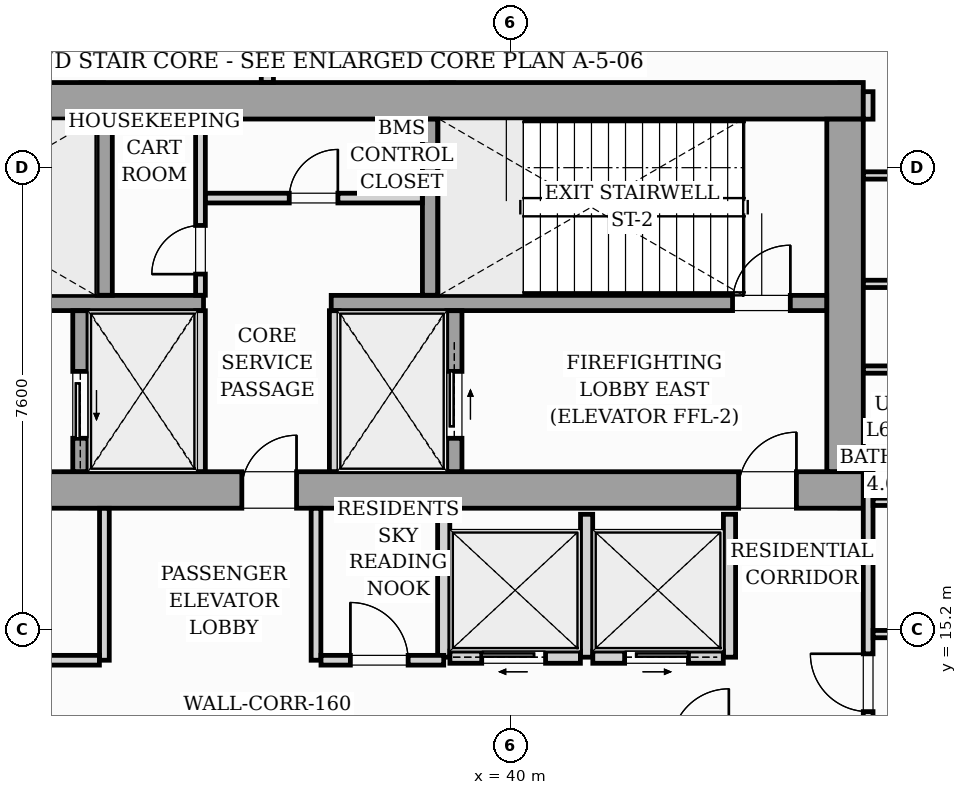
"""IFC4 building model, lengths in metres.
Left out: names, types, materials, properties, quantities, classifications, styles, units other than length and angle.
Written with IfcOpenShell. Run it as: python <this file> out.ifc"""

import sys

from ifc_helpers import new_model, si_unit, direction, frame, frame_2d, origin, origin_2d, place, context, subcontext, project, spatial, rectangle, i_section, extrude, source, transform, mapped, element, fill, save


model = new_model("IFC4")
c1 = context("Model", 3, precision=1e-05, world=origin(), true_north=direction((0.0, 1.0)))
c2 = subcontext(c1, "Body", "Model", "MODEL_VIEW")
j1 = project(units=[si_unit("LENGTHUNIT", "METRE"), si_unit("PLANEANGLEUNIT", "RADIAN")], contexts=[c1])
p1 = place(None, origin())
s1 = spatial("IfcSite", under=j1, at=p1, CompositionType="ELEMENT")
p2 = place(p1, origin())
s2 = spatial("IfcBuilding", under=s1, at=p2, CompositionType="ELEMENT")
p3 = place(p2, frame((0.0, 0.0, 211.4)))
s3 = spatial("IfcBuildingStorey", under=s2, at=p3, CompositionType="ELEMENT", Elevation=211.4)
m1 = source(origin(), c2, "Body", "SweptSolid", [
    extrude(i_section(OverallWidth=0.409, OverallDepth=0.425, WebThickness=0.033, FlangeThickness=0.052, FilletRadius=0.018, at=origin_2d()), origin(), (0.0, 0.0, 1.0), 5.196),
])
for number, where, z_axis, x_axis in (
    (1, (33.12, 17.4, 0.002), (0.0, 0.0, 1.0), (1.0, 0.0, 0.0)),
    (2, (38.88, 17.4, 0.002), (0.0, 0.0, 1.0), (1.0, 0.0, 0.0)),
    (3, (45.6, 17.4, 0.002), (0.0, 0.0, 1.0), (1.0, 0.0, 0.0)),
    (4, (33.12, 24.0, 0.002), (0.0, 0.0, 1.0), (1.0, 0.0, 0.0)),
    (5, (38.88, 24.0, 0.002), (0.0, 0.0, 1.0), (1.0, 0.0, 0.0)),
    (6, (45.6, 24.0, 0.002), (0.0, 0.0, 1.0), (1.0, 0.0, 0.0)),
):
    element("IfcColumn", number, at=place(p3, frame(where, z_axis=z_axis, x_axis=x_axis)), inside=s3, PredefinedType="PILASTER", context=c2, shape_type="MappedRepresentation", body=[
        mapped(m1, transform((0.0, 0.0, 0.0), scale=1.0)),
    ])
p4 = place(p3, frame((26.2, 17.5, 0.0), z_axis=(0.0, 0.0, 1.0), x_axis=(1.0, 0.0, 0.0)))
e7 = element("IfcWall", 7, at=p4, inside=s3, PredefinedType="SHEAR", context=c2, shape_type="SweptSolid", body=[
    extrude(rectangle(XDim=19.6, YDim=0.6, at=frame_2d((9.8, 0.0))), origin(), (0.0, 0.0, 1.0), 5.2),
])
p5 = place(p4, frame((0.95, 0.0, 0.0)))
e8 = element("IfcOpeningElement", 8, at=p5, cuts=e7, PredefinedType="OPENING", context=c2, shape_type="SweptSolid", body=[
    extrude(rectangle(XDim=0.95, YDim=2.06, at=frame_2d((0.475, 1.03))), frame((0.0, 0.31, 0.0), z_axis=(0.0, -1.0, 0.0), x_axis=(1.0, 0.0, 0.0)), (0.0, 0.0, 1.0), 0.62),
])
p6 = place(p4, frame((9.38, 0.0, 0.0)))
e9 = element("IfcOpeningElement", 9, at=p6, cuts=e7, PredefinedType="OPENING", context=c2, shape_type="SweptSolid", body=[
    extrude(rectangle(XDim=0.9, YDim=2.06, at=frame_2d((0.45, 1.03))), frame((0.0, 0.31, 0.0), z_axis=(0.0, -1.0, 0.0), x_axis=(1.0, 0.0, 0.0)), (0.0, 0.0, 1.0), 0.62),
])
p7 = place(p4, frame((17.55, 0.0, 0.0)))
e10 = element("IfcOpeningElement", 10, at=p7, cuts=e7, PredefinedType="OPENING", context=c2, shape_type="SweptSolid", body=[
    extrude(rectangle(XDim=0.95, YDim=2.06, at=frame_2d((0.475, 1.03))), frame((0.0, 0.31, 0.0), z_axis=(0.0, -1.0, 0.0), x_axis=(1.0, 0.0, 0.0)), (0.0, 0.0, 1.0), 0.62),
])
p8 = place(p3, frame((26.2, 23.9, 0.0), z_axis=(0.0, 0.0, 1.0), x_axis=(1.0, 0.0, 0.0)))
e11 = element("IfcWall", 11, at=p8, inside=s3, PredefinedType="SHEAR", context=c2, shape_type="SweptSolid", body=[
    extrude(rectangle(XDim=19.6, YDim=0.6, at=frame_2d((9.8, 0.0))), origin(), (0.0, 0.0, 1.0), 5.2),
])
p9 = place(p3, frame((45.5, 17.802, 0.0), z_axis=(0.0, 0.0, 1.0), x_axis=(0.0, 1.0, 0.0)))
e12 = element("IfcWall", 12, at=p9, inside=s3, PredefinedType="SHEAR", context=c2, shape_type="SweptSolid", body=[
    extrude(rectangle(XDim=5.796, YDim=0.6, at=frame_2d((2.898, 0.0))), origin(), (0.0, 0.0, 1.0), 5.2),
])
p10 = place(p3, frame((26.802, 20.575, 0.0), z_axis=(0.0, 0.0, 1.0), x_axis=(1.0, 0.0, 0.0)))
e13 = element("IfcWall", 13, at=p10, inside=s3, PredefinedType="SOLIDWALL", context=c2, shape_type="SweptSolid", body=[
    extrude(rectangle(XDim=8.148, YDim=0.25, at=frame_2d((4.074, 0.0))), origin(), (0.0, 0.0, 1.0), 5.2),
])
p11 = place(p10, frame((0.298, 0.0, 0.0)))
e14 = element("IfcOpeningElement", 14, at=p11, cuts=e13, PredefinedType="OPENING", context=c2, shape_type="SweptSolid", body=[
    extrude(rectangle(XDim=0.95, YDim=2.06, at=frame_2d((0.475, 1.03))), frame((0.0, 0.135, 0.0), z_axis=(0.0, -1.0, 0.0), x_axis=(1.0, 0.0, 0.0)), (0.0, 0.0, 1.0), 0.27),
])
p12 = place(p3, frame((37.05, 20.575, 0.0), z_axis=(0.0, 0.0, 1.0), x_axis=(1.0, 0.0, 0.0)))
e15 = element("IfcWall", 15, at=p12, inside=s3, PredefinedType="SOLIDWALL", context=c2, shape_type="SweptSolid", body=[
    extrude(rectangle(XDim=8.148, YDim=0.25, at=frame_2d((4.074, 0.0))), origin(), (0.0, 0.0, 1.0), 5.2),
])
p13 = place(p12, frame((6.6, 0.0, 0.0)))
e16 = element("IfcOpeningElement", 16, at=p13, cuts=e15, PredefinedType="OPENING", context=c2, shape_type="SweptSolid", body=[
    extrude(rectangle(XDim=0.95, YDim=2.06, at=frame_2d((0.475, 1.03))), frame((0.0, 0.135, 0.0), z_axis=(0.0, -1.0, 0.0), x_axis=(1.0, 0.0, 0.0)), (0.0, 0.0, 1.0), 0.27),
])
for number, where, z_axis, x_axis in (
    (17, (33.325, 20.702, 0.0), (0.0, 0.0, 1.0), (0.0, 1.0, 0.0)),
    (18, (38.675, 20.702, 0.0), (0.0, 0.0, 1.0), (0.0, 1.0, 0.0)),
):
    element("IfcWall", number, at=place(p3, frame(where, z_axis=z_axis, x_axis=x_axis)), inside=s3, PredefinedType="SOLIDWALL", context=c2, shape_type="SweptSolid", body=[
        extrude(rectangle(XDim=2.896, YDim=0.25, at=frame_2d((1.448, 0.0))), origin(), (0.0, 0.0, 1.0), 5.2),
    ])
p14 = place(p3, frame((32.925, 17.802, 0.0), z_axis=(0.0, 0.0, 1.0), x_axis=(0.0, 1.0, 0.0)))
e19 = element("IfcWall", 19, at=p14, inside=s3, PredefinedType="SOLIDWALL", context=c2, shape_type="SweptSolid", body=[
    extrude(rectangle(XDim=2.646, YDim=0.25, at=frame_2d((1.323, 0.0))), origin(), (0.0, 0.0, 1.0), 5.2),
])
p15 = place(p14, frame((0.548, 0.0, 0.0)))
e20 = element("IfcOpeningElement", 20, at=p15, cuts=e19, PredefinedType="OPENING", context=c2, shape_type="SweptSolid", body=[
    extrude(rectangle(XDim=1.1, YDim=2.08, at=frame_2d((0.55, 1.04))), frame((0.0, 0.135, 0.0), z_axis=(0.0, -1.0, 0.0), x_axis=(1.0, 0.0, 0.0)), (0.0, 0.0, 1.0), 0.27),
])
for number, where, z_axis, x_axis in (
    (21, (34.9, 17.802, 0.0), (0.0, 0.0, 1.0), (0.0, 1.0, 0.0)),
    (22, (37.1, 17.802, 0.0), (0.0, 0.0, 1.0), (0.0, 1.0, 0.0)),
):
    element("IfcWall", number, at=place(p3, frame(where, z_axis=z_axis, x_axis=x_axis)), inside=s3, PredefinedType="PARTITIONING", context=c2, shape_type="SweptSolid", body=[
        extrude(rectangle(XDim=2.646, YDim=0.16, at=frame_2d((1.323, 0.0))), origin(), (0.0, 0.0, 1.0), 4.78),
    ])
p16 = place(p3, frame((39.075, 17.802, 0.0), z_axis=(0.0, 0.0, 1.0), x_axis=(0.0, 1.0, 0.0)))
e23 = element("IfcWall", 23, at=p16, inside=s3, PredefinedType="SOLIDWALL", context=c2, shape_type="SweptSolid", body=[
    extrude(rectangle(XDim=2.646, YDim=0.25, at=frame_2d((1.323, 0.0))), origin(), (0.0, 0.0, 1.0), 5.2),
])
p17 = place(p16, frame((0.548, 0.0, 0.0)))
e24 = element("IfcOpeningElement", 24, at=p17, cuts=e23, PredefinedType="OPENING", context=c2, shape_type="SweptSolid", body=[
    extrude(rectangle(XDim=1.1, YDim=2.08, at=frame_2d((0.55, 1.04))), frame((0.0, 0.135, 0.0), z_axis=(0.0, -1.0, 0.0), x_axis=(1.0, 0.0, 0.0)), (0.0, 0.0, 1.0), 0.27),
])
p18 = place(p3, frame((34.9, 20.702, 0.0), z_axis=(0.0, 0.0, 1.0), x_axis=(0.0, 1.0, 0.0)))
e25 = element("IfcWall", 25, at=p18, inside=s3, PredefinedType="PARTITIONING", context=c2, shape_type="SweptSolid", body=[
    extrude(rectangle(XDim=2.896, YDim=0.16, at=frame_2d((1.448, 0.0))), origin(), (0.0, 0.0, 1.0), 4.78),
])
p19 = place(p18, frame((0.348, 0.0, 0.0)))
e26 = element("IfcOpeningElement", 26, at=p19, cuts=e25, PredefinedType="OPENING", context=c2, shape_type="SweptSolid", body=[
    extrude(rectangle(XDim=0.8, YDim=2.05, at=frame_2d((0.4, 1.025))), frame((0.0, 0.09, 0.0), z_axis=(0.0, -1.0, 0.0), x_axis=(1.0, 0.0, 0.0)), (0.0, 0.0, 1.0), 0.18),
])
p20 = place(p3, frame((34.982, 22.3, 0.0), z_axis=(0.0, 0.0, 1.0), x_axis=(1.0, 0.0, 0.0)))
e27 = element("IfcWall", 27, at=p20, inside=s3, PredefinedType="PARTITIONING", context=c2, shape_type="SweptSolid", body=[
    extrude(rectangle(XDim=3.566, YDim=0.16, at=frame_2d((1.783, 0.0))), origin(), (0.0, 0.0, 1.0), 4.78),
])
p21 = place(p20, frame((1.378, 0.0, 0.0)))
e28 = element("IfcOpeningElement", 28, at=p21, cuts=e27, PredefinedType="OPENING", context=c2, shape_type="SweptSolid", body=[
    extrude(rectangle(XDim=0.8, YDim=2.05, at=frame_2d((0.4, 1.025))), frame((0.0, 0.09, 0.0), z_axis=(0.0, -1.0, 0.0), x_axis=(1.0, 0.0, 0.0)), (0.0, 0.0, 1.0), 0.18),
])
for number, where, z_axis, x_axis in (
    (29, (38.9, 14.75, 0.0), (0.0, 0.0, 1.0), (0.0, 1.0, 0.0)),
    (30, (41.25, 14.75, 0.0), (0.0, 0.0, 1.0), (0.0, 1.0, 0.0)),
    (31, (43.6, 14.75, 0.0), (0.0, 0.0, 1.0), (0.0, 1.0, 0.0)),
):
    element("IfcWall", number, at=place(p3, frame(where, z_axis=z_axis, x_axis=x_axis)), inside=s3, PredefinedType="PARTITIONING", context=c2, shape_type="SweptSolid", body=[
        extrude(rectangle(XDim=2.35, YDim=0.2, at=frame_2d((1.175, 0.0))), origin(), (0.0, 0.0, 1.0), 4.78),
    ])
p22 = place(p3, frame((39.002, 14.75, 0.0), z_axis=(0.0, 0.0, 1.0), x_axis=(1.0, 0.0, 0.0)))
e32 = element("IfcWall", 32, at=p22, inside=s3, PredefinedType="PARTITIONING", context=c2, shape_type="SweptSolid", body=[
    extrude(rectangle(XDim=2.146, YDim=0.2, at=frame_2d((1.073, 0.0))), origin(), (0.0, 0.0, 1.0), 4.78),
])
p23 = place(p22, frame((0.523, 0.0, 0.0)))
e33 = element("IfcOpeningElement", 33, at=p23, cuts=e32, PredefinedType="OPENING", context=c2, shape_type="SweptSolid", body=[
    extrude(rectangle(XDim=1.05, YDim=2.08, at=frame_2d((0.525, 1.04))), frame((0.0, 0.11, 0.0), z_axis=(0.0, -1.0, 0.0), x_axis=(1.0, 0.0, 0.0)), (0.0, 0.0, 1.0), 0.22),
])
p24 = place(p3, frame((41.352, 14.75, 0.0), z_axis=(0.0, 0.0, 1.0), x_axis=(1.0, 0.0, 0.0)))
e34 = element("IfcWall", 34, at=p24, inside=s3, PredefinedType="PARTITIONING", context=c2, shape_type="SweptSolid", body=[
    extrude(rectangle(XDim=2.146, YDim=0.2, at=frame_2d((1.073, 0.0))), origin(), (0.0, 0.0, 1.0), 4.78),
])
p25 = place(p24, frame((0.523, 0.0, 0.0)))
e35 = element("IfcOpeningElement", 35, at=p25, cuts=e34, PredefinedType="OPENING", context=c2, shape_type="SweptSolid", body=[
    extrude(rectangle(XDim=1.05, YDim=2.08, at=frame_2d((0.525, 1.04))), frame((0.0, 0.11, 0.0), z_axis=(0.0, -1.0, 0.0), x_axis=(1.0, 0.0, 0.0)), (0.0, 0.0, 1.0), 0.22),
])
p26 = place(p3, frame((45.88, 13.362, 0.0), z_axis=(0.0, 0.0, 1.0), x_axis=(0.0, 1.0, 0.0)))
e36 = element("IfcWall", 36, at=p26, inside=s3, PredefinedType="PARTITIONING", context=c2, shape_type="SweptSolid", body=[
    extrude(rectangle(XDim=4.44, YDim=0.16, at=frame_2d((2.22, 0.0))), origin(), (0.0, 0.0, 1.0), 4.78),
])
p27 = place(p26, frame((0.493, 0.0, 0.0)))
e37 = element("IfcOpeningElement", 37, at=p27, cuts=e36, PredefinedType="OPENING", context=c2, shape_type="SweptSolid", body=[
    extrude(rectangle(XDim=0.95, YDim=2.06, at=frame_2d((0.475, 1.03))), frame((0.0, 0.09, 0.0), z_axis=(0.0, -1.0, 0.0), x_axis=(1.0, 0.0, 0.0)), (0.0, 0.0, 1.0), 0.18),
])
p28 = place(p3, frame((45.88, 23.598, 0.0), z_axis=(0.0, 0.0, 1.0), x_axis=(0.0, 1.0, 0.0)))
e38 = element("IfcWall", 38, at=p28, inside=s3, PredefinedType="PARTITIONING", context=c2, shape_type="SweptSolid", body=[
    extrude(rectangle(XDim=0.452, YDim=0.16, at=frame_2d((0.226, 0.0))), origin(), (0.0, 0.0, 1.0), 4.78),
])
p29 = place(p3, frame((36.0, 24.202, 0.0), z_axis=(0.0, 0.0, 1.0), x_axis=(0.0, 1.0, 0.0)))
e39 = element("IfcWall", 39, at=p29, inside=s3, PredefinedType="PARTITIONING", context=c2, shape_type="SweptSolid", body=[
    extrude(rectangle(XDim=2.181, YDim=0.2, at=frame_2d((1.09, 0.0))), origin(), (0.0, 0.0, 1.0), 4.78),
])
p30 = place(p3, frame((45.962, 17.305, 0.0), z_axis=(0.0, 0.0, 1.0), x_axis=(1.0, 0.0, 0.0)))
e40 = element("IfcWall", 40, at=p30, inside=s3, PredefinedType="PARTITIONING", context=c2, shape_type="SweptSolid", body=[
    extrude(rectangle(XDim=2.256, YDim=0.12, at=frame_2d((1.128, 0.0))), origin(), (0.0, 0.0, 1.0), 4.122),
])
p31 = place(p3, frame((45.962, 15.13, 0.0), z_axis=(0.0, 0.0, 1.0), x_axis=(1.0, 0.0, 0.0)))
e41 = element("IfcWall", 41, at=p31, inside=s3, PredefinedType="PARTITIONING", context=c2, shape_type="SweptSolid", body=[
    extrude(rectangle(XDim=2.256, YDim=0.12, at=frame_2d((1.128, 0.0))), origin(), (0.0, 0.0, 1.0), 4.78),
])
p32 = place(p3, frame((45.802, 19.48, 0.0), z_axis=(0.0, 0.0, 1.0), x_axis=(1.0, 0.0, 0.0)))
e42 = element("IfcWall", 42, at=p32, inside=s3, PredefinedType="PARTITIONING", context=c2, shape_type="SweptSolid", body=[
    extrude(rectangle(XDim=2.416, YDim=0.12, at=frame_2d((1.208, 0.0))), origin(), (0.0, 0.0, 1.0), 4.78),
])
p33 = place(p3, frame((45.802, 22.672, 0.0), z_axis=(0.0, 0.0, 1.0), x_axis=(1.0, 0.0, 0.0)))
e43 = element("IfcWall", 43, at=p33, inside=s3, PredefinedType="PARTITIONING", context=c2, shape_type="SweptSolid", body=[
    extrude(rectangle(XDim=9.402, YDim=0.12, at=frame_2d((4.701, 0.0))), origin(), (0.0, 0.0, 1.0), 4.78),
])
p34 = place(p33, frame((2.297, 0.0, 0.0)))
e44 = element("IfcOpeningElement", 44, at=p34, cuts=e43, PredefinedType="OPENING", context=c2, shape_type="SweptSolid", body=[
    extrude(rectangle(XDim=0.85, YDim=2.05, at=frame_2d((0.425, 1.025))), frame((0.0, 0.07, 0.0), z_axis=(0.0, -1.0, 0.0), x_axis=(1.0, 0.0, 0.0)), (0.0, 0.0, 1.0), 0.14),
])
p35 = place(p3, frame((45.802, 20.889, 0.0), z_axis=(0.0, 0.0, 1.0), x_axis=(1.0, 0.0, 0.0)))
e45 = element("IfcWall", 45, at=p35, inside=s3, PredefinedType="PARTITIONING", context=c2, shape_type="SweptSolid", body=[
    extrude(rectangle(XDim=10.494, YDim=0.12, at=frame_2d((5.247, 0.0))), origin(), (0.0, 0.0, 1.0), 4.78),
])
p36 = place(p35, frame((2.962, 0.0, 0.0)))
e46 = element("IfcOpeningElement", 46, at=p36, cuts=e45, PredefinedType="OPENING", context=c2, shape_type="SweptSolid", body=[
    extrude(rectangle(XDim=0.85, YDim=2.05, at=frame_2d((0.425, 1.025))), frame((0.0, 0.07, 0.0), z_axis=(0.0, -1.0, 0.0), x_axis=(1.0, 0.0, 0.0)), (0.0, 0.0, 1.0), 0.14),
])
p37 = place(p3, frame((33.32, 14.7, 0.0), z_axis=(0.0, 0.0, 1.0), x_axis=(0.0, 1.0, 0.0)))
e47 = element("IfcWall", 47, at=p37, inside=s3, PredefinedType="PARTITIONING", context=c2, shape_type="SweptSolid", body=[
    extrude(rectangle(XDim=2.498, YDim=0.16, at=frame_2d((1.249, 0.0))), origin(), (0.0, 0.0, 1.0), 4.78),
])
p38 = place(p3, frame((28.442, 14.7, 0.0), z_axis=(0.0, 0.0, 1.0), x_axis=(1.0, 0.0, 0.0)))
e48 = element("IfcWall", 48, at=p38, inside=s3, PredefinedType="PARTITIONING", context=c2, shape_type="SweptSolid", body=[
    extrude(rectangle(XDim=4.796, YDim=0.16, at=frame_2d((2.398, 0.0))), origin(), (0.0, 0.0, 1.0), 4.345),
])
p39 = place(p38, frame((1.948, 0.0, 0.0)))
e49 = element("IfcOpeningElement", 49, at=p39, cuts=e48, PredefinedType="OPENING", context=c2, shape_type="SweptSolid", body=[
    extrude(rectangle(XDim=0.9, YDim=2.05, at=frame_2d((0.45, 1.025))), frame((0.0, 0.09, 0.0), z_axis=(0.0, -1.0, 0.0), x_axis=(1.0, 0.0, 0.0)), (0.0, 0.0, 1.0), 0.18),
])
p40 = place(p3, frame((36.8, 14.7, 0.0), z_axis=(0.0, 0.0, 1.0), x_axis=(0.0, 1.0, 0.0)))
e50 = element("IfcWall", 50, at=p40, inside=s3, PredefinedType="PARTITIONING", context=c2, shape_type="SweptSolid", body=[
    extrude(rectangle(XDim=2.498, YDim=0.16, at=frame_2d((1.249, 0.0))), origin(), (0.0, 0.0, 1.0), 4.78),
])
p41 = place(p3, frame((36.882, 14.7, 0.0), z_axis=(0.0, 0.0, 1.0), x_axis=(1.0, 0.0, 0.0)))
e51 = element("IfcWall", 51, at=p41, inside=s3, PredefinedType="PARTITIONING", context=c2, shape_type="SweptSolid", body=[
    extrude(rectangle(XDim=2.018, YDim=0.16, at=frame_2d((1.009, 0.0))), origin(), (0.0, 0.0, 1.0), 4.78),
])
p42 = place(p41, frame((0.483, 0.0, 0.0)))
e52 = element("IfcOpeningElement", 52, at=p42, cuts=e51, PredefinedType="OPENING", context=c2, shape_type="SweptSolid", body=[
    extrude(rectangle(XDim=0.95, YDim=2.06, at=frame_2d((0.475, 1.03))), frame((0.0, 0.09, 0.0), z_axis=(0.0, -1.0, 0.0), x_axis=(1.0, 0.0, 0.0)), (0.0, 0.0, 1.0), 0.18),
])
m2 = source(origin(), c2, "Body", "SweptSolid", [
    extrude(rectangle(XDim=0.9, YDim=2.06, at=frame_2d((0.45, 1.03))), frame((0.0, 0.025, 0.0), z_axis=(0.0, -1.0, 0.0), x_axis=(1.0, 0.0, 0.0)), (0.0, 0.0, 1.0), 0.05),
])
p43 = place(p6, origin())
e53 = element("IfcDoor", 53, at=p43, inside=s3, OperationType="SINGLE_SWING_RIGHT", PredefinedType="DOOR", context=c2, shape_type="MappedRepresentation", body=[
    mapped(m2, transform((0.0, 0.0, 0.0), scale=1.0)),
])
fill(e9, e53)
m3 = source(origin(), c2, "Body", "SweptSolid", [
    extrude(rectangle(XDim=0.95, YDim=2.06, at=frame_2d((0.475, 1.03))), frame((0.0, 0.025, 0.0), z_axis=(0.0, -1.0, 0.0), x_axis=(1.0, 0.0, 0.0)), (0.0, 0.0, 1.0), 0.05),
])
p44 = place(p7, origin())
e54 = element("IfcDoor", 54, at=p44, inside=s3, OperationType="SINGLE_SWING_RIGHT", PredefinedType="DOOR", context=c2, shape_type="MappedRepresentation", body=[
    mapped(m3, transform((0.0, 0.0, 0.0), scale=1.0)),
])
fill(e10, e54)
p45 = place(p13, origin())
e55 = element("IfcDoor", 55, at=p45, inside=s3, OperationType="SINGLE_SWING_RIGHT", PredefinedType="DOOR", context=c2, shape_type="MappedRepresentation", body=[
    mapped(m3, transform((0.0, 0.0, 0.0), scale=1.0)),
])
fill(e16, e55)
m4 = source(origin(), c2, "Body", "SweptSolid", [
    extrude(rectangle(XDim=1.1, YDim=2.08, at=frame_2d((0.55, 1.04))), frame((0.0, 0.025, 0.0), z_axis=(0.0, -1.0, 0.0), x_axis=(1.0, 0.0, 0.0)), (0.0, 0.0, 1.0), 0.05),
])
p46 = place(p15, origin())
e56 = element("IfcDoor", 56, at=p46, inside=s3, OperationType="SLIDING_TO_LEFT", PredefinedType="DOOR", context=c2, shape_type="MappedRepresentation", body=[
    mapped(m4, transform((0.0, 0.0, 0.0), scale=1.0)),
])
fill(e20, e56)
p47 = place(p17, origin())
e57 = element("IfcDoor", 57, at=p47, inside=s3, OperationType="SLIDING_TO_RIGHT", PredefinedType="DOOR", context=c2, shape_type="MappedRepresentation", body=[
    mapped(m4, transform((0.0, 0.0, 0.0), scale=1.0)),
])
fill(e24, e57)
m5 = source(origin(), c2, "Body", "SweptSolid", [
    extrude(rectangle(XDim=0.8, YDim=2.05, at=frame_2d((0.4, 1.025))), frame((0.0, 0.025, 0.0), z_axis=(0.0, -1.0, 0.0), x_axis=(1.0, 0.0, 0.0)), (0.0, 0.0, 1.0), 0.05),
])
p48 = place(p19, origin())
e58 = element("IfcDoor", 58, at=p48, inside=s3, OperationType="SINGLE_SWING_LEFT", PredefinedType="DOOR", context=c2, shape_type="MappedRepresentation", body=[
    mapped(m5, transform((0.0, 0.0, 0.0), scale=1.0)),
])
fill(e26, e58)
p49 = place(p21, origin())
e59 = element("IfcDoor", 59, at=p49, inside=s3, OperationType="SINGLE_SWING_RIGHT", PredefinedType="DOOR", context=c2, shape_type="MappedRepresentation", body=[
    mapped(m5, transform((0.0, 0.0, 0.0), scale=1.0)),
])
fill(e28, e59)
m6 = source(origin(), c2, "Body", "SweptSolid", [
    extrude(rectangle(XDim=1.05, YDim=2.08, at=frame_2d((0.525, 1.04))), frame((0.0, 0.025, 0.0), z_axis=(0.0, -1.0, 0.0), x_axis=(1.0, 0.0, 0.0)), (0.0, 0.0, 1.0), 0.05),
])
p50 = place(p23, origin())
e60 = element("IfcDoor", 60, at=p50, inside=s3, OperationType="SLIDING_TO_LEFT", PredefinedType="DOOR", context=c2, shape_type="MappedRepresentation", body=[
    mapped(m6, transform((0.0, 0.0, 0.0), scale=1.0)),
])
fill(e33, e60)
p51 = place(p25, origin())
e61 = element("IfcDoor", 61, at=p51, inside=s3, OperationType="SLIDING_TO_RIGHT", PredefinedType="DOOR", context=c2, shape_type="MappedRepresentation", body=[
    mapped(m6, transform((0.0, 0.0, 0.0), scale=1.0)),
])
fill(e35, e61)
m7 = source(origin(), c2, "Body", "SweptSolid", [
    extrude(rectangle(XDim=0.95, YDim=2.06, at=frame_2d((0.475, 1.03))), frame((0.0, 0.025, 0.0), z_axis=(0.0, -1.0, 0.0), x_axis=(1.0, 0.0, 0.0)), (0.0, 0.0, 1.0), 0.05),
])
p52 = place(p27, origin())
e62 = element("IfcDoor", 62, at=p52, inside=s3, OperationType="SINGLE_SWING_RIGHT", PredefinedType="DOOR", context=c2, shape_type="MappedRepresentation", body=[
    mapped(m7, transform((0.0, 0.0, 0.0), scale=1.0)),
])
fill(e37, e62)
p53 = place(p42, origin())
e63 = element("IfcDoor", 63, at=p53, inside=s3, OperationType="SINGLE_SWING_LEFT", PredefinedType="DOOR", context=c2, shape_type="MappedRepresentation", body=[
    mapped(m7, transform((0.0, 0.0, 0.0), scale=1.0)),
])
fill(e52, e63)
save(model, sys.argv[1])
